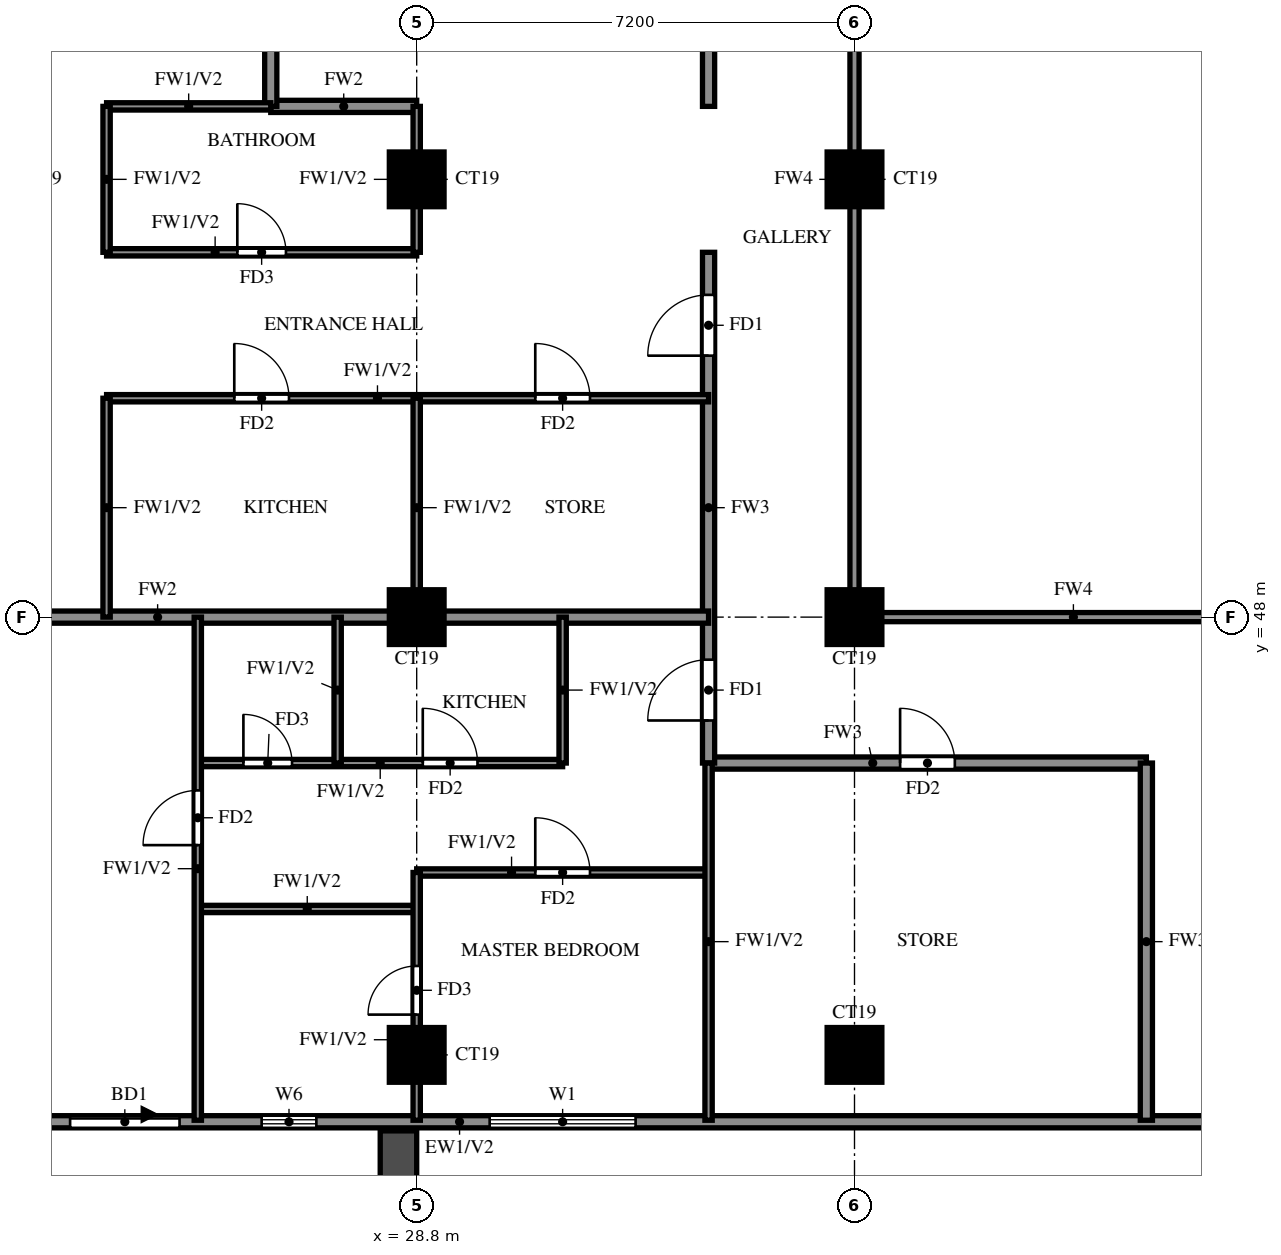
"""IFC4 building model, lengths in metres.
Left out: names, types, materials, properties, quantities, classifications, styles, units other than length and angle.
Written with IfcOpenShell. Run it as: python <this file> out.ifc"""

import sys

from ifc_helpers import new_model, si_unit, direction, frame, frame_2d, origin, origin_2d, place, context, subcontext, project, spatial, rectangle, extrude, source, transform, mapped, element, fill, save


model = new_model("IFC4")
c1 = context("Model", 3, precision=1e-05, world=origin(), true_north=direction((0.0, 1.0)))
c2 = subcontext(c1, "Body", "Model", "MODEL_VIEW")
j1 = project(units=[si_unit("LENGTHUNIT", "METRE"), si_unit("PLANEANGLEUNIT", "RADIAN")], contexts=[c1])
p1 = place(None, origin())
s1 = spatial("IfcSite", under=j1, at=p1, CompositionType="ELEMENT")
p2 = place(p1, origin())
s2 = spatial("IfcBuilding", under=s1, at=p2, CompositionType="ELEMENT")
p3 = place(p2, frame((0.0, 0.0, 188.5)))
s3 = spatial("IfcBuildingStorey", under=s2, at=p3, CompositionType="ELEMENT", Elevation=188.5)
m1 = source(origin(), c2, "Body", "SweptSolid", [
    extrude(rectangle(XDim=0.9, YDim=0.9, at=origin_2d()), origin(), (0.0, 0.0, 1.0), 3.2),
])
for number, where, z_axis, x_axis in (
    (1, (28.8, 40.8, 0.0), (0.0, 0.0, 1.0), (1.0, 0.0, 0.0)),
    (2, (36.0, 40.8, 0.0), (0.0, 0.0, 1.0), (1.0, 0.0, 0.0)),
    (3, (28.8, 48.0, 0.0), (0.0, 0.0, 1.0), (1.0, 0.0, 0.0)),
    (4, (36.0, 48.0, 0.0), (0.0, 0.0, 1.0), (1.0, 0.0, 0.0)),
    (5, (28.8, 55.2, 0.0), (0.0, 0.0, 1.0), (1.0, 0.0, 0.0)),
    (6, (36.0, 55.2, 0.0), (0.0, 0.0, 1.0), (1.0, 0.0, 0.0)),
):
    element("IfcColumn", number, at=place(p3, frame(where, z_axis=z_axis, x_axis=x_axis)), inside=s3, PredefinedType="COLUMN", context=c2, shape_type="MappedRepresentation", body=[
        mapped(m1, transform((0.0, 0.0, 0.0))),
    ])
p4 = place(p3, frame((18.2, 39.7, 0.0), z_axis=(0.0, 0.0, 1.0), x_axis=(1.0, 0.0, 0.0)))
e7 = element("IfcWall", 7, at=p4, inside=s3, PredefinedType="SOLIDWALL", context=c2, shape_type="SweptSolid", body=[
    extrude(rectangle(XDim=23.8, YDim=0.2, at=frame_2d((11.9, 0.0))), origin(), (0.0, 0.0, 1.0), 3.2),
])
p5 = place(p4, frame((4.9, 0.0, 0.0)))
e8 = element("IfcOpeningElement", 8, at=p5, cuts=e7, PredefinedType="OPENING", context=c2, shape_type="SweptSolid", body=[
    extrude(rectangle(XDim=1.8, YDim=2.4, at=frame_2d((0.9, 1.2))), frame((0.0, 0.11, 0.0), z_axis=(0.0, -1.0, 0.0), x_axis=(1.0, 0.0, 0.0)), (0.0, 0.0, 1.0), 0.22),
])
p6 = place(p4, frame((0.6, 0.0, 0.6)))
e9 = element("IfcOpeningElement", 9, at=p6, cuts=e7, PredefinedType="OPENING", context=c2, shape_type="SweptSolid", body=[
    extrude(rectangle(XDim=2.4, YDim=2.4, at=frame_2d((1.2, 1.2))), frame((0.0, 0.11, 0.0), z_axis=(0.0, -1.0, 0.0), x_axis=(1.0, 0.0, 0.0)), (0.0, 0.0, 1.0), 0.22),
])
p7 = place(p4, frame((11.8, 0.0, 0.6)))
e10 = element("IfcOpeningElement", 10, at=p7, cuts=e7, PredefinedType="OPENING", context=c2, shape_type="SweptSolid", body=[
    extrude(rectangle(XDim=2.4, YDim=2.4, at=frame_2d((1.2, 1.2))), frame((0.0, 0.11, 0.0), z_axis=(0.0, -1.0, 0.0), x_axis=(1.0, 0.0, 0.0)), (0.0, 0.0, 1.0), 0.22),
])
p8 = place(p4, frame((8.05, 0.0, 1.5)))
e11 = element("IfcOpeningElement", 11, at=p8, cuts=e7, PredefinedType="OPENING", context=c2, shape_type="SweptSolid", body=[
    extrude(rectangle(XDim=0.9, YDim=0.9, at=frame_2d((0.45, 0.45))), frame((0.0, 0.11, 0.0), z_axis=(0.0, -1.0, 0.0), x_axis=(1.0, 0.0, 0.0)), (0.0, 0.0, 1.0), 0.22),
])
p9 = place(p3, frame((28.5, 39.55, 0.0), z_axis=(0.0, 0.0, 1.0), x_axis=(0.0, -1.0, 0.0)))
e12 = element("IfcWall", 12, at=p9, inside=s3, PredefinedType="SOLIDWALL", context=c2, shape_type="SweptSolid", body=[
    extrude(rectangle(XDim=2.65, YDim=0.6, at=frame_2d((1.325, 0.0))), origin(), (0.0, 0.0, 1.0), 2.85),
])
p10 = place(p3, frame((33.6, 45.6, 0.0), z_axis=(0.0, 0.0, 1.0), x_axis=(1.0, 0.0, 0.0)))
e13 = element("IfcWall", 13, at=p10, inside=s3, PredefinedType="SOLIDWALL", context=c2, shape_type="SweptSolid", body=[
    extrude(rectangle(XDim=7.2, YDim=0.2, at=frame_2d((3.6, 0.0))), origin(), (0.0, 0.0, 1.0), 3.2),
])
p11 = place(p10, frame((3.15, 0.0, 0.0)))
e14 = element("IfcOpeningElement", 14, at=p11, cuts=e13, PredefinedType="OPENING", context=c2, shape_type="SweptSolid", body=[
    extrude(rectangle(XDim=0.9, YDim=2.1, at=frame_2d((0.45, 1.05))), frame((0.0, 0.11, 0.0), z_axis=(0.0, -1.0, 0.0), x_axis=(1.0, 0.0, 0.0)), (0.0, 0.0, 1.0), 0.22),
])
p12 = place(p3, frame((33.6, 45.6, 0.0), z_axis=(0.0, 0.0, 1.0), x_axis=(0.0, 1.0, 0.0)))
e15 = element("IfcWall", 15, at=p12, inside=s3, PredefinedType="SOLIDWALL", context=c2, shape_type="SweptSolid", body=[
    extrude(rectangle(XDim=8.4, YDim=0.2, at=frame_2d((4.2, 0.0))), origin(), (0.0, 0.0, 1.0), 3.2),
])
p13 = place(p12, frame((0.7, 0.0, 0.0)))
e16 = element("IfcOpeningElement", 16, at=p13, cuts=e15, PredefinedType="OPENING", context=c2, shape_type="SweptSolid", body=[
    extrude(rectangle(XDim=1.0, YDim=2.1, at=frame_2d((0.5, 1.05))), frame((0.0, 0.11, 0.0), z_axis=(0.0, -1.0, 0.0), x_axis=(1.0, 0.0, 0.0)), (0.0, 0.0, 1.0), 0.22),
])
p14 = place(p12, frame((6.7, 0.0, 0.0)))
e17 = element("IfcOpeningElement", 17, at=p14, cuts=e15, PredefinedType="OPENING", context=c2, shape_type="SweptSolid", body=[
    extrude(rectangle(XDim=1.0, YDim=2.1, at=frame_2d((0.5, 1.05))), frame((0.0, 0.11, 0.0), z_axis=(0.0, -1.0, 0.0), x_axis=(1.0, 0.0, 0.0)), (0.0, 0.0, 1.0), 0.22),
])
p15 = place(p3, frame((33.6, 56.4, 0.0), z_axis=(0.0, 0.0, 1.0), x_axis=(0.0, 1.0, 0.0)))
e18 = element("IfcWall", 18, at=p15, inside=s3, PredefinedType="SOLIDWALL", context=c2, shape_type="SweptSolid", body=[
    extrude(rectangle(XDim=6.0, YDim=0.2, at=frame_2d((3.0, 0.0))), origin(), (0.0, 0.0, 1.0), 3.2),
])
p16 = place(p15, frame((3.7, 0.0, 0.0)))
e19 = element("IfcOpeningElement", 19, at=p16, cuts=e18, PredefinedType="OPENING", context=c2, shape_type="SweptSolid", body=[
    extrude(rectangle(XDim=1.0, YDim=2.1, at=frame_2d((0.5, 1.05))), frame((0.0, 0.11, 0.0), z_axis=(0.0, -1.0, 0.0), x_axis=(1.0, 0.0, 0.0)), (0.0, 0.0, 1.0), 0.22),
])
p17 = place(p3, frame((40.8, 39.725, 0.0), z_axis=(0.0, 0.0, 1.0), x_axis=(0.0, 1.0, 0.0)))
e20 = element("IfcWall", 20, at=p17, inside=s3, PredefinedType="SOLIDWALL", context=c2, shape_type="SweptSolid", body=[
    extrude(rectangle(XDim=5.875, YDim=0.2, at=frame_2d((2.938, 0.0))), origin(), (0.0, 0.0, 1.0), 3.2),
])
p18 = place(p3, frame((14.525, 48.0, 0.0), z_axis=(0.0, 0.0, 1.0), x_axis=(1.0, 0.0, 0.0)))
e21 = element("IfcWall", 21, at=p18, inside=s3, PredefinedType="SOLIDWALL", context=c2, shape_type="SweptSolid", body=[
    extrude(rectangle(XDim=19.075, YDim=0.2, at=frame_2d((9.538, 0.0))), origin(), (0.0, 0.0, 1.0), 3.2),
])
for number, where, z_axis, x_axis in (
    (22, (26.4, 56.4, 0.0), (0.0, 0.0, 1.0), (1.0, 0.0, 0.0)),
    (23, (26.4, 56.4, 0.0), (0.0, 0.0, 1.0), (0.0, 1.0, 0.0)),
):
    element("IfcWall", number, at=place(p3, frame(where, z_axis=z_axis, x_axis=x_axis)), inside=s3, PredefinedType="SOLIDWALL", context=c2, shape_type="SweptSolid", body=[
        extrude(rectangle(XDim=2.4, YDim=0.2, at=frame_2d((1.2, 0.0))), origin(), (0.0, 0.0, 1.0), 3.2),
    ])
p19 = place(p3, frame((25.2, 43.2, 0.0), z_axis=(0.0, 0.0, 1.0), x_axis=(1.0, 0.0, 0.0)))
e24 = element("IfcWall", 24, at=p19, inside=s3, PredefinedType="PARTITIONING", context=c2, shape_type="SweptSolid", body=[
    extrude(rectangle(XDim=3.6, YDim=0.12, at=frame_2d((1.8, 0.0))), origin(), (0.0, 0.0, 1.0), 3.2),
])
p20 = place(p3, frame((28.8, 43.8, 0.0), z_axis=(0.0, 0.0, 1.0), x_axis=(1.0, 0.0, 0.0)))
e25 = element("IfcWall", 25, at=p20, inside=s3, PredefinedType="PARTITIONING", context=c2, shape_type="SweptSolid", body=[
    extrude(rectangle(XDim=4.8, YDim=0.12, at=frame_2d((2.4, 0.0))), origin(), (0.0, 0.0, 1.0), 3.2),
])
p21 = place(p20, frame((1.95, 0.0, 0.0)))
e26 = element("IfcOpeningElement", 26, at=p21, cuts=e25, PredefinedType="OPENING", context=c2, shape_type="SweptSolid", body=[
    extrude(rectangle(XDim=0.9, YDim=2.1, at=frame_2d((0.45, 1.05))), frame((0.0, 0.07, 0.0), z_axis=(0.0, -1.0, 0.0), x_axis=(1.0, 0.0, 0.0)), (0.0, 0.0, 1.0), 0.14),
])
p22 = place(p3, frame((25.2, 45.6, 0.0), z_axis=(0.0, 0.0, 1.0), x_axis=(1.0, 0.0, 0.0)))
e27 = element("IfcWall", 27, at=p22, inside=s3, PredefinedType="PARTITIONING", context=c2, shape_type="SweptSolid", body=[
    extrude(rectangle(XDim=6.0, YDim=0.12, at=frame_2d((3.0, 0.0))), origin(), (0.0, 0.0, 1.0), 3.2),
])
p23 = place(p22, frame((0.75, 0.0, 0.0)))
e28 = element("IfcOpeningElement", 28, at=p23, cuts=e27, PredefinedType="OPENING", context=c2, shape_type="SweptSolid", body=[
    extrude(rectangle(XDim=0.8, YDim=2.1, at=frame_2d((0.4, 1.05))), frame((0.0, 0.07, 0.0), z_axis=(0.0, -1.0, 0.0), x_axis=(1.0, 0.0, 0.0)), (0.0, 0.0, 1.0), 0.14),
])
p24 = place(p22, frame((3.7, 0.0, 0.0)))
e29 = element("IfcOpeningElement", 29, at=p24, cuts=e27, PredefinedType="OPENING", context=c2, shape_type="SweptSolid", body=[
    extrude(rectangle(XDim=0.9, YDim=2.1, at=frame_2d((0.45, 1.05))), frame((0.0, 0.07, 0.0), z_axis=(0.0, -1.0, 0.0), x_axis=(1.0, 0.0, 0.0)), (0.0, 0.0, 1.0), 0.14),
])
p25 = place(p3, frame((23.7, 51.6, 0.0), z_axis=(0.0, 0.0, 1.0), x_axis=(1.0, 0.0, 0.0)))
e30 = element("IfcWall", 30, at=p25, inside=s3, PredefinedType="PARTITIONING", context=c2, shape_type="SweptSolid", body=[
    extrude(rectangle(XDim=9.9, YDim=0.12, at=frame_2d((4.95, 0.0))), origin(), (0.0, 0.0, 1.0), 3.2),
])
p26 = place(p25, frame((2.1, 0.0, 0.0)))
e31 = element("IfcOpeningElement", 31, at=p26, cuts=e30, PredefinedType="OPENING", context=c2, shape_type="SweptSolid", body=[
    extrude(rectangle(XDim=0.9, YDim=2.1, at=frame_2d((0.45, 1.05))), frame((0.0, 0.07, 0.0), z_axis=(0.0, -1.0, 0.0), x_axis=(1.0, 0.0, 0.0)), (0.0, 0.0, 1.0), 0.14),
])
p27 = place(p25, frame((7.05, 0.0, 0.0)))
e32 = element("IfcOpeningElement", 32, at=p27, cuts=e30, PredefinedType="OPENING", context=c2, shape_type="SweptSolid", body=[
    extrude(rectangle(XDim=0.9, YDim=2.1, at=frame_2d((0.45, 1.05))), frame((0.0, 0.07, 0.0), z_axis=(0.0, -1.0, 0.0), x_axis=(1.0, 0.0, 0.0)), (0.0, 0.0, 1.0), 0.14),
])
p28 = place(p3, frame((23.7, 54.0, 0.0), z_axis=(0.0, 0.0, 1.0), x_axis=(1.0, 0.0, 0.0)))
e33 = element("IfcWall", 33, at=p28, inside=s3, PredefinedType="PARTITIONING", context=c2, shape_type="SweptSolid", body=[
    extrude(rectangle(XDim=5.1, YDim=0.12, at=frame_2d((2.55, 0.0))), origin(), (0.0, 0.0, 1.0), 3.2),
])
p29 = place(p28, frame((2.15, 0.0, 0.0)))
e34 = element("IfcOpeningElement", 34, at=p29, cuts=e33, PredefinedType="OPENING", context=c2, shape_type="SweptSolid", body=[
    extrude(rectangle(XDim=0.8, YDim=2.1, at=frame_2d((0.4, 1.05))), frame((0.0, 0.07, 0.0), z_axis=(0.0, -1.0, 0.0), x_axis=(1.0, 0.0, 0.0)), (0.0, 0.0, 1.0), 0.14),
])
p30 = place(p3, frame((23.7, 56.4, 0.0), z_axis=(0.0, 0.0, 1.0), x_axis=(1.0, 0.0, 0.0)))
e35 = element("IfcWall", 35, at=p30, inside=s3, PredefinedType="PARTITIONING", context=c2, shape_type="SweptSolid", body=[
    extrude(rectangle(XDim=2.7, YDim=0.12, at=frame_2d((1.35, 0.0))), origin(), (0.0, 0.0, 1.0), 3.2),
])
p31 = place(p3, frame((23.7, 48.0, 0.0), z_axis=(0.0, 0.0, 1.0), x_axis=(0.0, 1.0, 0.0)))
e36 = element("IfcWall", 36, at=p31, inside=s3, PredefinedType="PARTITIONING", context=c2, shape_type="SweptSolid", body=[
    extrude(rectangle(XDim=3.6, YDim=0.12, at=frame_2d((1.8, 0.0))), origin(), (0.0, 0.0, 1.0), 3.2),
])
p32 = place(p3, frame((23.7, 54.0, 0.0), z_axis=(0.0, 0.0, 1.0), x_axis=(0.0, 1.0, 0.0)))
e37 = element("IfcWall", 37, at=p32, inside=s3, PredefinedType="PARTITIONING", context=c2, shape_type="SweptSolid", body=[
    extrude(rectangle(XDim=2.4, YDim=0.12, at=frame_2d((1.2, 0.0))), origin(), (0.0, 0.0, 1.0), 3.2),
])
p33 = place(p3, frame((25.2, 39.725, 0.0), z_axis=(0.0, 0.0, 1.0), x_axis=(0.0, 1.0, 0.0)))
e38 = element("IfcWall", 38, at=p33, inside=s3, PredefinedType="PARTITIONING", context=c2, shape_type="SweptSolid", body=[
    extrude(rectangle(XDim=8.275, YDim=0.12, at=frame_2d((4.137, 0.0))), origin(), (0.0, 0.0, 1.0), 3.2),
])
p34 = place(p33, frame((4.525, 0.0, 0.0)))
e39 = element("IfcOpeningElement", 39, at=p34, cuts=e38, PredefinedType="OPENING", context=c2, shape_type="SweptSolid", body=[
    extrude(rectangle(XDim=0.9, YDim=2.1, at=frame_2d((0.45, 1.05))), frame((0.0, 0.07, 0.0), z_axis=(0.0, -1.0, 0.0), x_axis=(1.0, 0.0, 0.0)), (0.0, 0.0, 1.0), 0.14),
])
p35 = place(p3, frame((27.5, 45.6, 0.0), z_axis=(0.0, 0.0, 1.0), x_axis=(0.0, 1.0, 0.0)))
e40 = element("IfcWall", 40, at=p35, inside=s3, PredefinedType="PARTITIONING", context=c2, shape_type="SweptSolid", body=[
    extrude(rectangle(XDim=2.4, YDim=0.12, at=frame_2d((1.2, 0.0))), origin(), (0.0, 0.0, 1.0), 3.2),
])
p36 = place(p3, frame((28.8, 39.725, 0.0), z_axis=(0.0, 0.0, 1.0), x_axis=(0.0, 1.0, 0.0)))
e41 = element("IfcWall", 41, at=p36, inside=s3, PredefinedType="PARTITIONING", context=c2, shape_type="SweptSolid", body=[
    extrude(rectangle(XDim=4.075, YDim=0.12, at=frame_2d((2.038, 0.0))), origin(), (0.0, 0.0, 1.0), 3.2),
])
p37 = place(p36, frame((1.738, 0.0, 0.0)))
e42 = element("IfcOpeningElement", 42, at=p37, cuts=e41, PredefinedType="OPENING", context=c2, shape_type="SweptSolid", body=[
    extrude(rectangle(XDim=0.8, YDim=2.1, at=frame_2d((0.4, 1.05))), frame((0.0, 0.07, 0.0), z_axis=(0.0, -1.0, 0.0), x_axis=(1.0, 0.0, 0.0)), (0.0, 0.0, 1.0), 0.14),
])
p38 = place(p3, frame((28.8, 48.0, 0.0), z_axis=(0.0, 0.0, 1.0), x_axis=(0.0, 1.0, 0.0)))
e43 = element("IfcWall", 43, at=p38, inside=s3, PredefinedType="PARTITIONING", context=c2, shape_type="SweptSolid", body=[
    extrude(rectangle(XDim=3.6, YDim=0.12, at=frame_2d((1.8, 0.0))), origin(), (0.0, 0.0, 1.0), 3.2),
])
for number, where, z_axis, x_axis in (
    (44, (28.8, 54.0, 0.0), (0.0, 0.0, 1.0), (0.0, 1.0, 0.0)),
    (45, (31.2, 45.6, 0.0), (0.0, 0.0, 1.0), (0.0, 1.0, 0.0)),
):
    element("IfcWall", number, at=place(p3, frame(where, z_axis=z_axis, x_axis=x_axis)), inside=s3, PredefinedType="PARTITIONING", context=c2, shape_type="SweptSolid", body=[
        extrude(rectangle(XDim=2.4, YDim=0.12, at=frame_2d((1.2, 0.0))), origin(), (0.0, 0.0, 1.0), 3.2),
    ])
p39 = place(p3, frame((33.6, 39.725, 0.0), z_axis=(0.0, 0.0, 1.0), x_axis=(0.0, 1.0, 0.0)))
e46 = element("IfcWall", 46, at=p39, inside=s3, PredefinedType="PARTITIONING", context=c2, shape_type="SweptSolid", body=[
    extrude(rectangle(XDim=5.875, YDim=0.12, at=frame_2d((2.938, 0.0))), origin(), (0.0, 0.0, 1.0), 3.2),
])
p40 = place(p3, frame((36.0, 48.0, 0.0), z_axis=(0.0, 0.0, 1.0), x_axis=(1.0, 0.0, 0.0)))
e47 = element("IfcWall", 47, at=p40, inside=s3, PredefinedType="SOLIDWALL", context=c2, shape_type="SweptSolid", body=[
    extrude(rectangle(XDim=7.2, YDim=0.15, at=frame_2d((3.6, 0.0))), origin(), (0.0, 0.0, 1.0), 2.3),
])
p41 = place(p3, frame((36.0, 48.0, 0.0), z_axis=(0.0, 0.0, 1.0), x_axis=(0.0, 1.0, 0.0)))
e48 = element("IfcWall", 48, at=p41, inside=s3, PredefinedType="SOLIDWALL", context=c2, shape_type="SweptSolid", body=[
    extrude(rectangle(XDim=14.4, YDim=0.15, at=frame_2d((7.2, 0.0))), origin(), (0.0, 0.0, 1.0), 2.3),
])
p42 = place(p5, origin())
e49 = element("IfcDoor", 49, at=p42, inside=s3, OperationType="DOUBLE_DOOR_SLIDING", PredefinedType="DOOR", context=c2, shape_type="SweptSolid", body=[
    extrude(rectangle(XDim=1.8, YDim=2.4, at=frame_2d((0.9, 1.2))), frame((0.0, 0.025, 0.0), z_axis=(0.0, -1.0, 0.0), x_axis=(1.0, 0.0, 0.0)), (0.0, 0.0, 1.0), 0.05),
])
fill(e8, e49)
p43 = place(p7, origin())
e50 = element("IfcWindow", 50, at=p43, inside=s3, PartitioningType="DOUBLE_PANEL_VERTICAL", PredefinedType="WINDOW", context=c2, shape_type="SweptSolid", body=[
    extrude(rectangle(XDim=2.4, YDim=2.4, at=frame_2d((1.2, 1.2))), frame((0.0, 0.03, 0.0), z_axis=(0.0, -1.0, 0.0), x_axis=(1.0, 0.0, 0.0)), (0.0, 0.0, 1.0), 0.06),
])
fill(e10, e50)
p44 = place(p8, origin())
e51 = element("IfcWindow", 51, at=p44, inside=s3, PartitioningType="SINGLE_PANEL", PredefinedType="WINDOW", context=c2, shape_type="SweptSolid", body=[
    extrude(rectangle(XDim=0.9, YDim=0.9, at=frame_2d((0.45, 0.45))), frame((0.0, 0.03, 0.0), z_axis=(0.0, -1.0, 0.0), x_axis=(1.0, 0.0, 0.0)), (0.0, 0.0, 1.0), 0.06),
])
fill(e11, e51)
p45 = place(p13, origin())
e52 = element("IfcDoor", 52, at=p45, inside=s3, OperationType="SINGLE_SWING_LEFT", PredefinedType="DOOR", context=c2, shape_type="SweptSolid", body=[
    extrude(rectangle(XDim=1.0, YDim=2.1, at=frame_2d((0.5, 1.05))), frame((0.0, 0.025, 0.0), z_axis=(0.0, -1.0, 0.0), x_axis=(1.0, 0.0, 0.0)), (0.0, 0.0, 1.0), 0.05),
])
fill(e16, e52)
p46 = place(p34, origin())
e53 = element("IfcDoor", 53, at=p46, inside=s3, OperationType="SINGLE_SWING_RIGHT", PredefinedType="DOOR", context=c2, shape_type="SweptSolid", body=[
    extrude(rectangle(XDim=0.9, YDim=2.1, at=frame_2d((0.45, 1.05))), frame((0.0, 0.025, 0.0), z_axis=(0.0, -1.0, 0.0), x_axis=(1.0, 0.0, 0.0)), (0.0, 0.0, 1.0), 0.05),
])
fill(e39, e53)
p47 = place(p21, origin())
e54 = element("IfcDoor", 54, at=p47, inside=s3, OperationType="SINGLE_SWING_LEFT", PredefinedType="DOOR", context=c2, shape_type="SweptSolid", body=[
    extrude(rectangle(XDim=0.9, YDim=2.1, at=frame_2d((0.45, 1.05))), frame((0.0, 0.025, 0.0), z_axis=(0.0, -1.0, 0.0), x_axis=(1.0, 0.0, 0.0)), (0.0, 0.0, 1.0), 0.05),
])
fill(e26, e54)
p48 = place(p37, origin())
e55 = element("IfcDoor", 55, at=p48, inside=s3, OperationType="SINGLE_SWING_RIGHT", PredefinedType="DOOR", context=c2, shape_type="SweptSolid", body=[
    extrude(rectangle(XDim=0.8, YDim=2.1, at=frame_2d((0.4, 1.05))), frame((0.0, 0.025, 0.0), z_axis=(0.0, -1.0, 0.0), x_axis=(1.0, 0.0, 0.0)), (0.0, 0.0, 1.0), 0.05),
])
fill(e42, e55)
p49 = place(p23, origin())
e56 = element("IfcDoor", 56, at=p49, inside=s3, OperationType="SINGLE_SWING_RIGHT", PredefinedType="DOOR", context=c2, shape_type="SweptSolid", body=[
    extrude(rectangle(XDim=0.8, YDim=2.1, at=frame_2d((0.4, 1.05))), frame((0.0, 0.025, 0.0), z_axis=(0.0, -1.0, 0.0), x_axis=(1.0, 0.0, 0.0)), (0.0, 0.0, 1.0), 0.05),
])
fill(e28, e56)
p50 = place(p24, origin())
e57 = element("IfcDoor", 57, at=p50, inside=s3, OperationType="SINGLE_SWING_LEFT", PredefinedType="DOOR", context=c2, shape_type="SweptSolid", body=[
    extrude(rectangle(XDim=0.9, YDim=2.1, at=frame_2d((0.45, 1.05))), frame((0.0, 0.025, 0.0), z_axis=(0.0, -1.0, 0.0), x_axis=(1.0, 0.0, 0.0)), (0.0, 0.0, 1.0), 0.05),
])
fill(e29, e57)
p51 = place(p11, origin())
e58 = element("IfcDoor", 58, at=p51, inside=s3, OperationType="SINGLE_SWING_LEFT", PredefinedType="DOOR", context=c2, shape_type="SweptSolid", body=[
    extrude(rectangle(XDim=0.9, YDim=2.1, at=frame_2d((0.45, 1.05))), frame((0.0, 0.025, 0.0), z_axis=(0.0, -1.0, 0.0), x_axis=(1.0, 0.0, 0.0)), (0.0, 0.0, 1.0), 0.05),
])
fill(e14, e58)
p52 = place(p14, origin())
e59 = element("IfcDoor", 59, at=p52, inside=s3, OperationType="SINGLE_SWING_RIGHT", PredefinedType="DOOR", context=c2, shape_type="SweptSolid", body=[
    extrude(rectangle(XDim=1.0, YDim=2.1, at=frame_2d((0.5, 1.05))), frame((0.0, 0.025, 0.0), z_axis=(0.0, -1.0, 0.0), x_axis=(1.0, 0.0, 0.0)), (0.0, 0.0, 1.0), 0.05),
])
fill(e17, e59)
p53 = place(p26, origin())
e60 = element("IfcDoor", 60, at=p53, inside=s3, OperationType="SINGLE_SWING_LEFT", PredefinedType="DOOR", context=c2, shape_type="SweptSolid", body=[
    extrude(rectangle(XDim=0.9, YDim=2.1, at=frame_2d((0.45, 1.05))), frame((0.0, 0.025, 0.0), z_axis=(0.0, -1.0, 0.0), x_axis=(1.0, 0.0, 0.0)), (0.0, 0.0, 1.0), 0.05),
])
fill(e31, e60)
p54 = place(p29, origin())
e61 = element("IfcDoor", 61, at=p54, inside=s3, OperationType="SINGLE_SWING_LEFT", PredefinedType="DOOR", context=c2, shape_type="SweptSolid", body=[
    extrude(rectangle(XDim=0.8, YDim=2.1, at=frame_2d((0.4, 1.05))), frame((0.0, 0.025, 0.0), z_axis=(0.0, -1.0, 0.0), x_axis=(1.0, 0.0, 0.0)), (0.0, 0.0, 1.0), 0.05),
])
fill(e34, e61)
p55 = place(p27, origin())
e62 = element("IfcDoor", 62, at=p55, inside=s3, OperationType="SINGLE_SWING_RIGHT", PredefinedType="DOOR", context=c2, shape_type="SweptSolid", body=[
    extrude(rectangle(XDim=0.9, YDim=2.1, at=frame_2d((0.45, 1.05))), frame((0.0, 0.025, 0.0), z_axis=(0.0, -1.0, 0.0), x_axis=(1.0, 0.0, 0.0)), (0.0, 0.0, 1.0), 0.05),
])
fill(e32, e62)
save(model, sys.argv[1])
